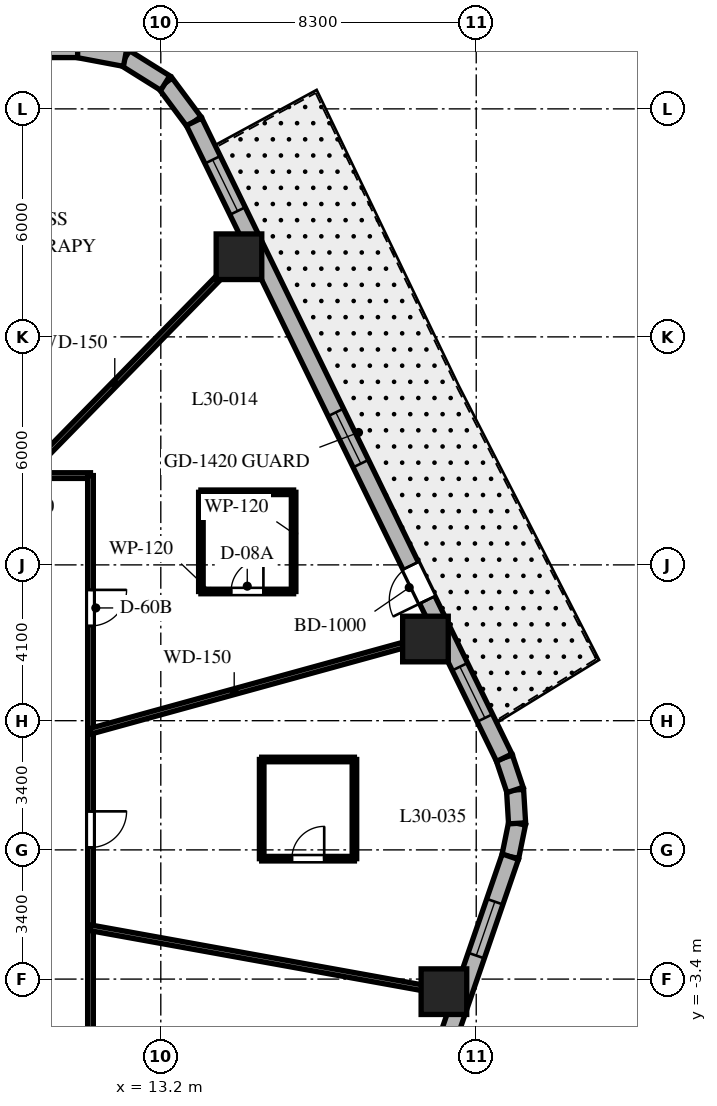
"""IFC4 building model, lengths in metres.
Left out: names, types, materials, properties, quantities, classifications, styles, units other than length and angle.
Written with IfcOpenShell. Run it as: python <this file> out.ifc"""

import sys

from ifc_helpers import new_model, si_unit, direction, frame, frame_2d, origin, origin_2d, place, context, subcontext, project, spatial, rectangle, extrude, element, fill, save


model = new_model("IFC4")
c1 = context("Model", 3, precision=1e-05, world=origin(), true_north=direction((0.0, 1.0)))
c2 = subcontext(c1, "Body", "Model", "MODEL_VIEW")
j1 = project(units=[si_unit("LENGTHUNIT", "METRE"), si_unit("PLANEANGLEUNIT", "RADIAN")], contexts=[c1])
p1 = place(None, origin())
s1 = spatial("IfcSite", under=j1, at=p1, CompositionType="ELEMENT")
p2 = place(p1, origin())
s2 = spatial("IfcBuilding", under=s1, at=p2, CompositionType="ELEMENT")
p3 = place(p2, frame((0.0, 0.0, 124.7)))
s3 = spatial("IfcBuildingStorey", under=s2, at=p3, CompositionType="ELEMENT", Elevation=124.7)
for number, where, z_axis, x_axis in (
    (1, (20.65, -3.731, 0.0), (0.0, 0.0, 1.0), (1.0, 0.0, 0.0)),
    (2, (20.164, 5.549, 0.0), (0.0, 0.0, 1.0), (1.0, 0.0, 0.0)),
    (3, (15.257, 15.609, 0.0), (0.0, 0.0, 1.0), (1.0, 0.0, 0.0)),
):
    element("IfcColumn", number, at=place(p3, frame(where, z_axis=z_axis, x_axis=x_axis)), inside=s3, PredefinedType="COLUMN", context=c2, shape_type="SweptSolid", body=[
        extrude(rectangle(XDim=1.2, YDim=1.2, at=origin_2d()), origin(), (0.0, 0.0, 1.0), 3.7),
    ])
p4 = place(p3, frame((22.397, -0.179, 0.0), z_axis=(0.0, 0.0, 1.0), x_axis=(0.199313589404, 0.979935759669, 0.0)))
e4 = element("IfcWall", 4, at=p4, inside=s3, PredefinedType="SOLIDWALL", context=c2, shape_type="SweptSolid", body=[
    extrude(rectangle(XDim=0.896, YDim=0.45, at=frame_2d((0.448, 0.0))), origin(), (0.0, 0.0, 1.0), 3.4),
])
p5 = place(p3, frame((22.575, 0.698, 0.0), z_axis=(0.0, 0.0, 1.0), x_axis=(-0.060980441946, 0.998138961117, 0.0)))
e5 = element("IfcWall", 5, at=p5, inside=s3, PredefinedType="SOLIDWALL", context=c2, shape_type="SweptSolid", body=[
    extrude(rectangle(XDim=0.881, YDim=0.45, at=frame_2d((0.44, 0.0))), origin(), (0.0, 0.0, 1.0), 3.4),
])
p6 = place(p3, frame((22.522, 1.577, 0.0), z_axis=(0.0, 0.0, 1.0), x_axis=(-0.317372694837, 0.948300887151, 0.0)))
e6 = element("IfcWall", 6, at=p6, inside=s3, PredefinedType="SOLIDWALL", context=c2, shape_type="SweptSolid", body=[
    extrude(rectangle(XDim=0.896, YDim=0.45, at=frame_2d((0.448, 0.0))), origin(), (0.0, 0.0, 1.0), 3.4),
])
p7 = place(p3, frame((14.076, 19.161, 0.0), z_axis=(0.0, 0.0, 1.0), x_axis=(-0.597226657159, 0.802072515412, 0.0)))
e7 = element("IfcWall", 7, at=p7, inside=s3, PredefinedType="SOLIDWALL", context=c2, shape_type="SweptSolid", body=[
    extrude(rectangle(XDim=1.269, YDim=0.45, at=frame_2d((0.635, 0.0))), origin(), (0.0, 0.0, 1.0), 3.4),
])
p8 = place(p3, frame((13.318, 20.179, 0.0), z_axis=(0.0, 0.0, 1.0), x_axis=(-0.848031272749, 0.529946186362, 0.0)))
e8 = element("IfcWall", 8, at=p8, inside=s3, PredefinedType="SOLIDWALL", context=c2, shape_type="SweptSolid", body=[
    extrude(rectangle(XDim=1.248, YDim=0.45, at=frame_2d((0.624, 0.0))), origin(), (0.0, 0.0, 1.0), 3.4),
])
p9 = place(p3, frame((12.259, 20.84, 0.0), z_axis=(0.0, 0.0, 1.0), x_axis=(-0.982730354425, 0.185043374624, 0.0)))
e9 = element("IfcWall", 9, at=p9, inside=s3, PredefinedType="SOLIDWALL", context=c2, shape_type="SweptSolid", body=[
    extrude(rectangle(XDim=1.269, YDim=0.45, at=frame_2d((0.635, 0.0))), origin(), (0.0, 0.0, 1.0), 3.4),
])
p10 = place(p3, frame((15.992, -18.777, 0.0), z_axis=(0.0, 0.0, 1.0), x_axis=(0.325606988926, 0.945505202927, 0.0)))
e10 = element("IfcWall", 10, at=p10, inside=s3, PredefinedType="SOLIDWALL", context=c2, shape_type="SweptSolid", body=[
    extrude(rectangle(XDim=19.669, YDim=0.45, at=frame_2d((9.835, 0.0))), origin(), (0.0, 0.0, 1.0), 3.4),
])
p11 = place(p10, frame((1.197, 0.0, 0.8)))
e11 = element("IfcOpeningElement", 11, at=p11, cuts=e10, PredefinedType="OPENING", context=c2, shape_type="SweptSolid", body=[
    extrude(rectangle(XDim=1.5, YDim=1.8, at=frame_2d((0.75, 0.9))), frame((0.0, 0.235, 0.0), z_axis=(0.0, -1.0, 0.0), x_axis=(1.0, 0.0, 0.0)), (0.0, 0.0, 1.0), 0.47),
])
p12 = place(p10, frame((9.03, 0.0, 0.8)))
e12 = element("IfcOpeningElement", 12, at=p12, cuts=e10, PredefinedType="OPENING", context=c2, shape_type="SweptSolid", body=[
    extrude(rectangle(XDim=1.5, YDim=1.8, at=frame_2d((0.75, 0.9))), frame((0.0, 0.235, 0.0), z_axis=(0.0, -1.0, 0.0), x_axis=(1.0, 0.0, 0.0)), (0.0, 0.0, 1.0), 0.47),
])
p13 = place(p10, frame((16.918, 0.0, 0.8)))
e13 = element("IfcOpeningElement", 13, at=p13, cuts=e10, PredefinedType="OPENING", context=c2, shape_type="SweptSolid", body=[
    extrude(rectangle(XDim=1.5, YDim=1.8, at=frame_2d((0.75, 0.9))), frame((0.0, 0.235, 0.0), z_axis=(0.0, -1.0, 0.0), x_axis=(1.0, 0.0, 0.0)), (0.0, 0.0, 1.0), 0.47),
])
p14 = place(p3, frame((22.238, 2.427, 0.0), z_axis=(0.0, 0.0, 1.0), x_axis=(-0.438374803278, 0.898792262901, 0.0)))
e14 = element("IfcWall", 14, at=p14, inside=s3, PredefinedType="SOLIDWALL", context=c2, shape_type="SweptSolid", body=[
    extrude(rectangle(XDim=18.618, YDim=0.45, at=frame_2d((9.309, 0.0))), origin(), (0.0, 0.0, 1.0), 3.4),
])
p15 = place(p14, frame((4.62, 0.0, 0.0)))
e15 = element("IfcOpeningElement", 15, at=p15, cuts=e14, PredefinedType="OPENING", context=c2, shape_type="SweptSolid", body=[
    extrude(rectangle(XDim=1.0, YDim=2.15, at=frame_2d((0.5, 1.075))), frame((0.0, 0.235, 0.0), z_axis=(0.0, -1.0, 0.0), x_axis=(1.0, 0.0, 0.0)), (0.0, 0.0, 1.0), 0.47),
])
p16 = place(p14, frame((8.61, 0.0, 0.8)))
e16 = element("IfcOpeningElement", 16, at=p16, cuts=e14, PredefinedType="OPENING", context=c2, shape_type="SweptSolid", body=[
    extrude(rectangle(XDim=1.5, YDim=1.8, at=frame_2d((0.75, 0.9))), frame((0.0, 0.235, 0.0), z_axis=(0.0, -1.0, 0.0), x_axis=(1.0, 0.0, 0.0)), (0.0, 0.0, 1.0), 0.47),
])
p17 = place(p14, frame((16.006, 0.0, 0.8)))
e17 = element("IfcOpeningElement", 17, at=p17, cuts=e14, PredefinedType="OPENING", context=c2, shape_type="SweptSolid", body=[
    extrude(rectangle(XDim=1.5, YDim=1.8, at=frame_2d((0.75, 0.9))), frame((0.0, 0.235, 0.0), z_axis=(0.0, -1.0, 0.0), x_axis=(1.0, 0.0, 0.0)), (0.0, 0.0, 1.0), 0.47),
])
p18 = place(p14, frame((1.163, 0.0, 0.8)))
e18 = element("IfcOpeningElement", 18, at=p18, cuts=e14, PredefinedType="OPENING", context=c2, shape_type="SweptSolid", body=[
    extrude(rectangle(XDim=1.5, YDim=1.8, at=frame_2d((0.75, 0.9))), frame((0.0, 0.235, 0.0), z_axis=(0.0, -1.0, 0.0), x_axis=(1.0, 0.0, 0.0)), (0.0, 0.0, 1.0), 0.47),
])
p19 = place(p3, frame((11.012, 21.075, 0.0), z_axis=(0.0, 0.0, 1.0), x_axis=(-1.0, 0.0, 0.0)))
e19 = element("IfcWall", 19, at=p19, inside=s3, PredefinedType="SOLIDWALL", context=c2, shape_type="SweptSolid", body=[
    extrude(rectangle(XDim=23.782, YDim=0.45, at=frame_2d((11.891, 0.0))), origin(), (0.0, 0.0, 1.0), 3.4),
])
p20 = place(p19, frame((2.473, 0.0, 0.0)))
e20 = element("IfcOpeningElement", 20, at=p20, cuts=e19, PredefinedType="OPENING", context=c2, shape_type="SweptSolid", body=[
    extrude(rectangle(XDim=0.95, YDim=2.15, at=frame_2d((0.475, 1.075))), frame((0.0, 0.235, 0.0), z_axis=(0.0, -1.0, 0.0), x_axis=(1.0, 0.0, 0.0)), (0.0, 0.0, 1.0), 0.47),
])
p21 = place(p19, frame((8.244, 0.0, 0.8)))
e21 = element("IfcOpeningElement", 21, at=p21, cuts=e19, PredefinedType="OPENING", context=c2, shape_type="SweptSolid", body=[
    extrude(rectangle(XDim=1.5, YDim=1.8, at=frame_2d((0.75, 0.9))), frame((0.0, 0.235, 0.0), z_axis=(0.0, -1.0, 0.0), x_axis=(1.0, 0.0, 0.0)), (0.0, 0.0, 1.0), 0.47),
])
p22 = place(p19, frame((14.811, 0.0, 0.8)))
e22 = element("IfcOpeningElement", 22, at=p22, cuts=e19, PredefinedType="OPENING", context=c2, shape_type="SweptSolid", body=[
    extrude(rectangle(XDim=1.5, YDim=1.8, at=frame_2d((0.75, 0.9))), frame((0.0, 0.235, 0.0), z_axis=(0.0, -1.0, 0.0), x_axis=(1.0, 0.0, 0.0)), (0.0, 0.0, 1.0), 0.47),
])
p23 = place(p19, frame((20.741, 0.0, 0.8)))
e23 = element("IfcOpeningElement", 23, at=p23, cuts=e19, PredefinedType="OPENING", context=c2, shape_type="SweptSolid", body=[
    extrude(rectangle(XDim=1.5, YDim=1.8, at=frame_2d((0.75, 0.9))), frame((0.0, 0.235, 0.0), z_axis=(0.0, -1.0, 0.0), x_axis=(1.0, 0.0, 0.0)), (0.0, 0.0, 1.0), 0.47),
])
p24 = place(p3, frame((-11.35, 9.85, 0.0), z_axis=(0.0, 0.0, 1.0), x_axis=(1.0, 0.0, 0.0)))
e24 = element("IfcWall", 24, at=p24, inside=s3, PredefinedType="PARTITIONING", context=c2, shape_type="SweptSolid", body=[
    extrude(rectangle(XDim=22.7, YDim=0.15, at=frame_2d((11.35, 0.0))), origin(), (0.0, 0.0, 1.0), 2.84),
])
p25 = place(p24, frame((17.237, 0.0, 0.0)))
e25 = element("IfcOpeningElement", 25, at=p25, cuts=e24, PredefinedType="OPENING", context=c2, shape_type="SweptSolid", body=[
    extrude(rectangle(XDim=0.95, YDim=2.03, at=frame_2d((0.475, 1.015))), frame((0.0, 0.085, 0.0), z_axis=(0.0, -1.0, 0.0), x_axis=(1.0, 0.0, 0.0)), (0.0, 0.0, 1.0), 0.17),
])
p26 = place(p24, frame((11.994, 0.0, 0.0)))
e26 = element("IfcOpeningElement", 26, at=p26, cuts=e24, PredefinedType="OPENING", context=c2, shape_type="SweptSolid", body=[
    extrude(rectangle(XDim=0.95, YDim=2.03, at=frame_2d((0.475, 1.015))), frame((0.0, 0.085, 0.0), z_axis=(0.0, -1.0, 0.0), x_axis=(1.0, 0.0, 0.0)), (0.0, 0.0, 1.0), 0.17),
])
p27 = place(p24, frame((8.559, 0.0, 0.0)))
e27 = element("IfcOpeningElement", 27, at=p27, cuts=e24, PredefinedType="OPENING", context=c2, shape_type="SweptSolid", body=[
    extrude(rectangle(XDim=0.95, YDim=2.03, at=frame_2d((0.475, 1.015))), frame((0.0, 0.085, 0.0), z_axis=(0.0, -1.0, 0.0), x_axis=(1.0, 0.0, 0.0)), (0.0, 0.0, 1.0), 0.17),
])
p28 = place(p24, frame((3.399, 0.0, 0.0)))
e28 = element("IfcOpeningElement", 28, at=p28, cuts=e24, PredefinedType="OPENING", context=c2, shape_type="SweptSolid", body=[
    extrude(rectangle(XDim=0.95, YDim=2.03, at=frame_2d((0.475, 1.015))), frame((0.0, 0.085, 0.0), z_axis=(0.0, -1.0, 0.0), x_axis=(1.0, 0.0, 0.0)), (0.0, 0.0, 1.0), 0.17),
])
p29 = place(p3, frame((11.35, 9.85, 0.0), z_axis=(0.0, 0.0, 1.0), x_axis=(0.0, -1.0, 0.0)))
e29 = element("IfcWall", 29, at=p29, inside=s3, PredefinedType="PARTITIONING", context=c2, shape_type="SweptSolid", body=[
    extrude(rectangle(XDim=19.7, YDim=0.15, at=frame_2d((9.85, 0.0))), origin(), (0.0, 0.0, 1.0), 2.84),
])
p30 = place(p29, frame((3.008, 0.0, 0.0)))
e30 = element("IfcOpeningElement", 30, at=p30, cuts=e29, PredefinedType="OPENING", context=c2, shape_type="SweptSolid", body=[
    extrude(rectangle(XDim=0.95, YDim=2.03, at=frame_2d((0.475, 1.015))), frame((0.0, 0.085, 0.0), z_axis=(0.0, -1.0, 0.0), x_axis=(1.0, 0.0, 0.0)), (0.0, 0.0, 1.0), 0.17),
])
p31 = place(p29, frame((15.205, 0.0, 0.0)))
e31 = element("IfcOpeningElement", 31, at=p31, cuts=e29, PredefinedType="OPENING", context=c2, shape_type="SweptSolid", body=[
    extrude(rectangle(XDim=0.95, YDim=2.03, at=frame_2d((0.475, 1.015))), frame((0.0, 0.085, 0.0), z_axis=(0.0, -1.0, 0.0), x_axis=(1.0, 0.0, 0.0)), (0.0, 0.0, 1.0), 0.17),
])
p32 = place(p29, frame((8.836, 0.0, 0.0)))
e32 = element("IfcOpeningElement", 32, at=p32, cuts=e29, PredefinedType="OPENING", context=c2, shape_type="SweptSolid", body=[
    extrude(rectangle(XDim=0.95, YDim=2.03, at=frame_2d((0.475, 1.015))), frame((0.0, 0.085, 0.0), z_axis=(0.0, -1.0, 0.0), x_axis=(1.0, 0.0, 0.0)), (0.0, 0.0, 1.0), 0.17),
])
p33 = place(p3, frame((11.35, 3.123, 0.0), z_axis=(0.0, 0.0, 1.0), x_axis=(0.964151983214, 0.265350623261, 0.0)))
e33 = element("IfcWall", 33, at=p33, inside=s3, PredefinedType="PARTITIONING", context=c2, shape_type="SweptSolid", body=[
    extrude(rectangle(XDim=9.645, YDim=0.15, at=frame_2d((4.823, 0.0))), origin(), (0.0, 0.0, 1.0), 2.54),
])
p34 = place(p3, frame((9.628, 9.85, 0.0), z_axis=(0.0, 0.0, 1.0), x_axis=(0.698992824326, 0.715128681805, 0.0)))
e34 = element("IfcWall", 34, at=p34, inside=s3, PredefinedType="PARTITIONING", context=c2, shape_type="SweptSolid", body=[
    extrude(rectangle(XDim=8.579, YDim=0.15, at=frame_2d((4.29, 0.0))), origin(), (0.0, 0.0, 1.0), 2.54),
])
p35 = place(p3, frame((11.35, -2.051, 0.0), z_axis=(0.0, 0.0, 1.0), x_axis=(0.984068313063, -0.177790762484, 0.0)))
e35 = element("IfcWall", 35, at=p35, inside=s3, PredefinedType="PARTITIONING", context=c2, shape_type="SweptSolid", body=[
    extrude(rectangle(XDim=9.951, YDim=0.15, at=frame_2d((4.976, 0.0))), origin(), (0.0, 0.0, 1.0), 2.54),
])
p36 = place(p3, frame((14.255, 6.8, 0.0), z_axis=(0.0, 0.0, 1.0), x_axis=(1.0, 0.0, 0.0)))
e36 = element("IfcWall", 36, at=p36, inside=s3, PredefinedType="PARTITIONING", context=c2, shape_type="SweptSolid", body=[
    extrude(rectangle(XDim=2.44, YDim=0.12, at=frame_2d((1.22, 0.0))), origin(), (0.0, 0.0, 1.0), 2.927),
])
p37 = place(p36, frame((0.795, 0.0, 0.0)))
e37 = element("IfcOpeningElement", 37, at=p37, cuts=e36, PredefinedType="OPENING", context=c2, shape_type="SweptSolid", body=[
    extrude(rectangle(XDim=0.85, YDim=2.03, at=frame_2d((0.425, 1.015))), frame((0.0, 0.07, 0.0), z_axis=(0.0, -1.0, 0.0), x_axis=(1.0, 0.0, 0.0)), (0.0, 0.0, 1.0), 0.14),
])
p38 = place(p3, frame((16.695, 6.8, 0.0), z_axis=(0.0, 0.0, 1.0), x_axis=(0.0, 1.0, 0.0)))
e38 = element("IfcWall", 38, at=p38, inside=s3, PredefinedType="PARTITIONING", context=c2, shape_type="SweptSolid", body=[
    extrude(rectangle(XDim=2.61, YDim=0.12, at=frame_2d((1.305, 0.0))), origin(), (0.0, 0.0, 1.0), 3.4),
])
p39 = place(p3, frame((16.695, 9.41, 0.0), z_axis=(0.0, 0.0, 1.0), x_axis=(-1.0, 0.0, 0.0)))
e39 = element("IfcWall", 39, at=p39, inside=s3, PredefinedType="PARTITIONING", context=c2, shape_type="SweptSolid", body=[
    extrude(rectangle(XDim=2.44, YDim=0.12, at=frame_2d((1.22, 0.0))), origin(), (0.0, 0.0, 1.0), 2.927),
])
p40 = place(p3, frame((14.255, 9.41, 0.0), z_axis=(0.0, 0.0, 1.0), x_axis=(0.0, -1.0, 0.0)))
e40 = element("IfcWall", 40, at=p40, inside=s3, PredefinedType="PARTITIONING", context=c2, shape_type="SweptSolid", body=[
    extrude(rectangle(XDim=2.61, YDim=0.12, at=frame_2d((1.305, 0.0))), origin(), (0.0, 0.0, 1.0), 3.4),
])
p41 = place(p3, frame((15.855, -0.231, 0.0), z_axis=(0.0, 0.0, 1.0), x_axis=(1.0, 0.0, 0.0)))
e41 = element("IfcWall", 41, at=p41, inside=s3, PredefinedType="PARTITIONING", context=c2, shape_type="SweptSolid", body=[
    extrude(rectangle(XDim=2.44, YDim=0.12, at=frame_2d((1.22, 0.0))), origin(), (0.0, 0.0, 1.0), 2.84),
])
p42 = place(p41, frame((0.795, 0.0, 0.0)))
e42 = element("IfcOpeningElement", 42, at=p42, cuts=e41, PredefinedType="OPENING", context=c2, shape_type="SweptSolid", body=[
    extrude(rectangle(XDim=0.85, YDim=2.03, at=frame_2d((0.425, 1.015))), frame((0.0, 0.07, 0.0), z_axis=(0.0, -1.0, 0.0), x_axis=(1.0, 0.0, 0.0)), (0.0, 0.0, 1.0), 0.14),
])
p43 = place(p3, frame((18.295, -0.231, 0.0), z_axis=(0.0, 0.0, 1.0), x_axis=(0.0, 1.0, 0.0)))
e43 = element("IfcWall", 43, at=p43, inside=s3, PredefinedType="PARTITIONING", context=c2, shape_type="SweptSolid", body=[
    extrude(rectangle(XDim=2.61, YDim=0.12, at=frame_2d((1.305, 0.0))), origin(), (0.0, 0.0, 1.0), 3.4),
])
p44 = place(p3, frame((18.295, 2.379, 0.0), z_axis=(0.0, 0.0, 1.0), x_axis=(-1.0, 0.0, 0.0)))
e44 = element("IfcWall", 44, at=p44, inside=s3, PredefinedType="PARTITIONING", context=c2, shape_type="SweptSolid", body=[
    extrude(rectangle(XDim=2.44, YDim=0.12, at=frame_2d((1.22, 0.0))), origin(), (0.0, 0.0, 1.0), 2.84),
])
p45 = place(p3, frame((15.855, 2.379, 0.0), z_axis=(0.0, 0.0, 1.0), x_axis=(0.0, -1.0, 0.0)))
e45 = element("IfcWall", 45, at=p45, inside=s3, PredefinedType="PARTITIONING", context=c2, shape_type="SweptSolid", body=[
    extrude(rectangle(XDim=2.61, YDim=0.12, at=frame_2d((1.305, 0.0))), origin(), (0.0, 0.0, 1.0), 3.4),
])
p46 = place(p13, origin())
e46 = element("IfcWindow", 46, at=p46, inside=s3, PartitioningType="SINGLE_PANEL", PredefinedType="WINDOW", context=c2, shape_type="SweptSolid", body=[
    extrude(rectangle(XDim=1.5, YDim=1.8, at=frame_2d((0.75, 0.9))), frame((0.0, 0.03, 0.0), z_axis=(0.0, -1.0, 0.0), x_axis=(1.0, 0.0, 0.0)), (0.0, 0.0, 1.0), 0.06),
])
fill(e13, e46)
p47 = place(p15, origin())
e47 = element("IfcDoor", 47, at=p47, inside=s3, OperationType="SINGLE_SWING_LEFT", PredefinedType="DOOR", context=c2, shape_type="SweptSolid", body=[
    extrude(rectangle(XDim=1.0, YDim=2.15, at=frame_2d((0.5, 1.075))), frame((0.0, 0.025, 0.0), z_axis=(0.0, -1.0, 0.0), x_axis=(1.0, 0.0, 0.0)), (0.0, 0.0, 1.0), 0.05),
])
fill(e15, e47)
p48 = place(p16, origin())
e48 = element("IfcWindow", 48, at=p48, inside=s3, PartitioningType="SINGLE_PANEL", PredefinedType="WINDOW", context=c2, shape_type="SweptSolid", body=[
    extrude(rectangle(XDim=1.5, YDim=1.8, at=frame_2d((0.75, 0.9))), frame((0.0, 0.03, 0.0), z_axis=(0.0, -1.0, 0.0), x_axis=(1.0, 0.0, 0.0)), (0.0, 0.0, 1.0), 0.06),
])
fill(e16, e48)
p49 = place(p17, origin())
e49 = element("IfcWindow", 49, at=p49, inside=s3, PartitioningType="SINGLE_PANEL", PredefinedType="WINDOW", context=c2, shape_type="SweptSolid", body=[
    extrude(rectangle(XDim=1.5, YDim=1.8, at=frame_2d((0.75, 0.9))), frame((0.0, 0.03, 0.0), z_axis=(0.0, -1.0, 0.0), x_axis=(1.0, 0.0, 0.0)), (0.0, 0.0, 1.0), 0.06),
])
fill(e17, e49)
p50 = place(p18, origin())
e50 = element("IfcWindow", 50, at=p50, inside=s3, PartitioningType="SINGLE_PANEL", PredefinedType="WINDOW", context=c2, shape_type="SweptSolid", body=[
    extrude(rectangle(XDim=1.5, YDim=1.8, at=frame_2d((0.75, 0.9))), frame((0.0, 0.03, 0.0), z_axis=(0.0, -1.0, 0.0), x_axis=(1.0, 0.0, 0.0)), (0.0, 0.0, 1.0), 0.06),
])
fill(e18, e50)
p51 = place(p30, origin())
e51 = element("IfcDoor", 51, at=p51, inside=s3, OperationType="SINGLE_SWING_LEFT", PredefinedType="DOOR", context=c2, shape_type="SweptSolid", body=[
    extrude(rectangle(XDim=0.95, YDim=2.03, at=frame_2d((0.475, 1.015))), frame((0.0, 0.025, 0.0), z_axis=(0.0, -1.0, 0.0), x_axis=(1.0, 0.0, 0.0)), (0.0, 0.0, 1.0), 0.05),
])
fill(e30, e51)
p52 = place(p37, origin())
e52 = element("IfcDoor", 52, at=p52, inside=s3, OperationType="SINGLE_SWING_RIGHT", PredefinedType="DOOR", context=c2, shape_type="SweptSolid", body=[
    extrude(rectangle(XDim=0.85, YDim=2.03, at=frame_2d((0.425, 1.015))), frame((0.0, 0.025, 0.0), z_axis=(0.0, -1.0, 0.0), x_axis=(1.0, 0.0, 0.0)), (0.0, 0.0, 1.0), 0.05),
])
fill(e37, e52)
p53 = place(p32, origin())
e53 = element("IfcDoor", 53, at=p53, inside=s3, OperationType="SINGLE_SWING_LEFT", PredefinedType="DOOR", context=c2, shape_type="SweptSolid", body=[
    extrude(rectangle(XDim=0.95, YDim=2.03, at=frame_2d((0.475, 1.015))), frame((0.0, 0.025, 0.0), z_axis=(0.0, -1.0, 0.0), x_axis=(1.0, 0.0, 0.0)), (0.0, 0.0, 1.0), 0.05),
])
fill(e32, e53)
p54 = place(p42, origin())
e54 = element("IfcDoor", 54, at=p54, inside=s3, OperationType="SINGLE_SWING_RIGHT", PredefinedType="DOOR", context=c2, shape_type="SweptSolid", body=[
    extrude(rectangle(XDim=0.85, YDim=2.03, at=frame_2d((0.425, 1.015))), frame((0.0, 0.025, 0.0), z_axis=(0.0, -1.0, 0.0), x_axis=(1.0, 0.0, 0.0)), (0.0, 0.0, 1.0), 0.05),
])
fill(e42, e54)
save(model, sys.argv[1])
